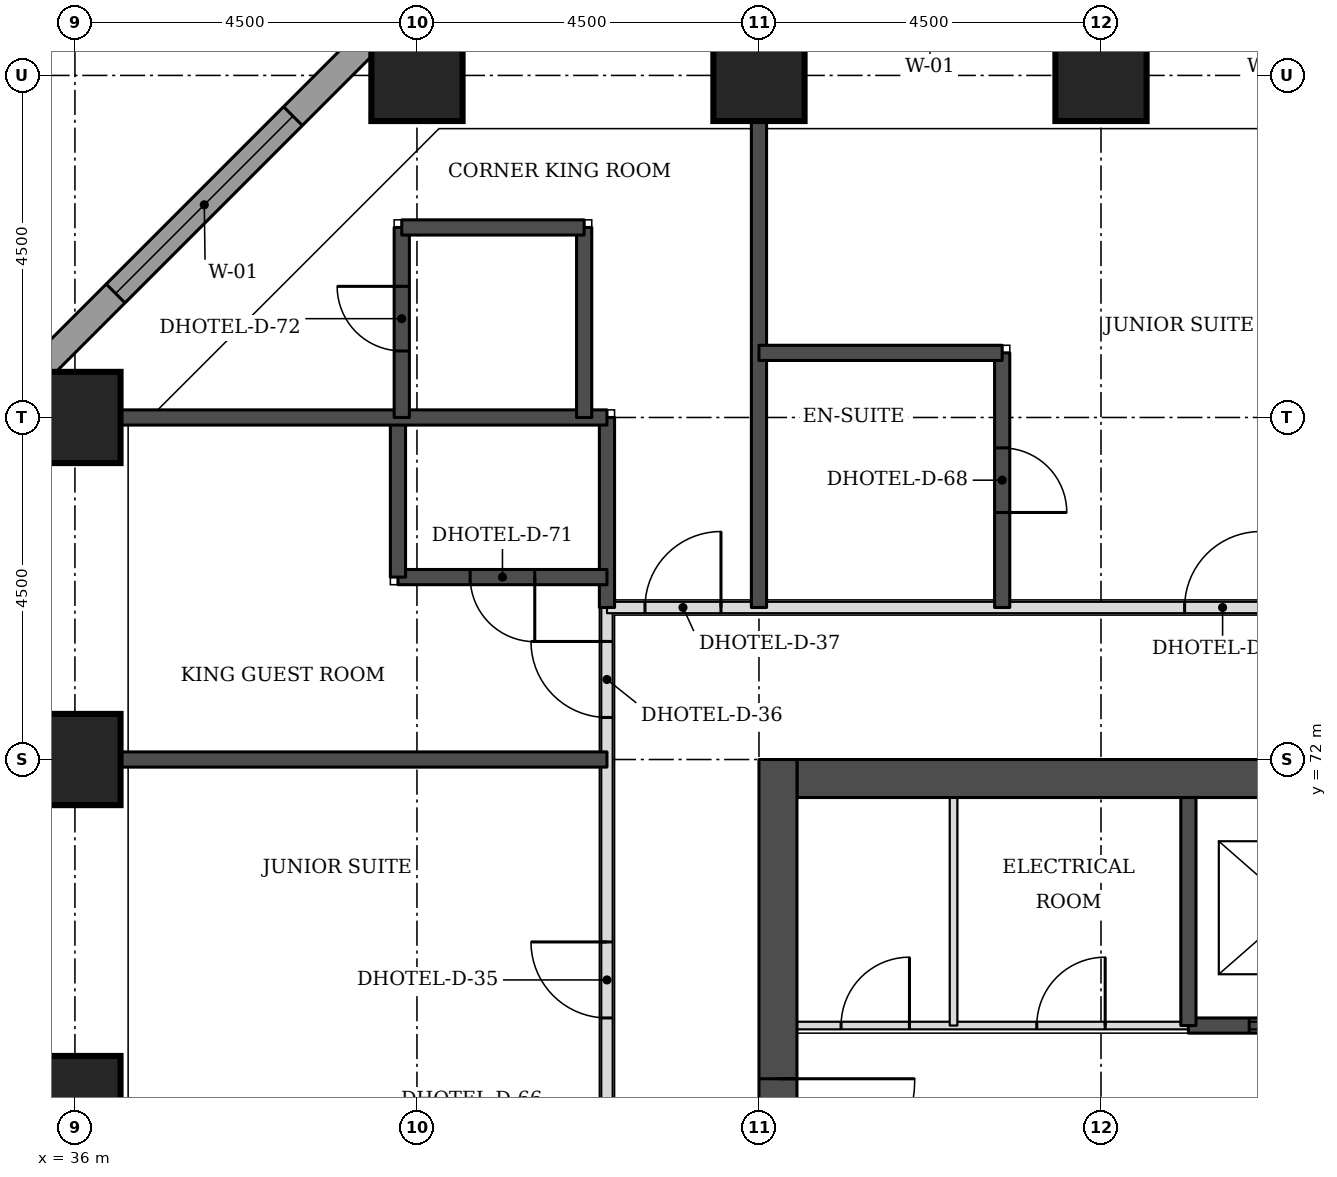
"""IFC4 building model, lengths in metres.
Left out: names, types, materials, properties, quantities, classifications, styles, units other than length and angle.
Written with IfcOpenShell. Run it as: python <this file> out.ifc"""

import sys

from ifc_helpers import new_model, si_unit, direction, frame, frame_2d, origin, origin_2d, place, context, subcontext, project, spatial, rectangle, extrude, element, fill, save


model = new_model("IFC4")
c1 = context("Model", 3, precision=1e-05, world=origin(), true_north=direction((0.0, 1.0)))
c2 = subcontext(c1, "Body", "Model", "MODEL_VIEW")
j1 = project(units=[si_unit("LENGTHUNIT", "METRE"), si_unit("PLANEANGLEUNIT", "RADIAN")], contexts=[c1])
p1 = place(None, origin())
s1 = spatial("IfcSite", under=j1, at=p1, CompositionType="ELEMENT")
p2 = place(p1, origin())
s2 = spatial("IfcBuilding", under=s1, at=p2, CompositionType="ELEMENT")
p3 = place(p2, frame((0.0, 0.0, 36.3)))
s3 = spatial("IfcBuildingStorey", under=s2, at=p3, CompositionType="ELEMENT", Elevation=36.3)
for number, where, z_axis, x_axis in (
    (1, (36.0, 67.5, 0.0), (0.0, 0.0, 1.0), (1.0, 0.0, 0.0)),
    (2, (36.0, 72.0, 0.0), (0.0, 0.0, 1.0), (1.0, 0.0, 0.0)),
    (3, (36.0, 76.5, 0.0), (0.0, 0.0, 1.0), (1.0, 0.0, 0.0)),
    (4, (40.5, 81.0, 0.0), (0.0, 0.0, 1.0), (1.0, 0.0, 0.0)),
    (5, (45.0, 81.0, 0.0), (0.0, 0.0, 1.0), (1.0, 0.0, 0.0)),
    (6, (49.5, 81.0, 0.0), (0.0, 0.0, 1.0), (1.0, 0.0, 0.0)),
):
    element("IfcColumn", number, at=place(p3, frame(where, z_axis=z_axis, x_axis=x_axis)), inside=s3, PredefinedType="COLUMN", context=c2, shape_type="SweptSolid", body=[
        extrude(rectangle(XDim=1.2, YDim=1.2, at=origin_2d()), origin(), (0.0, 0.0, 1.0), 3.3),
    ])
p4 = place(p3, frame((45.5, 71.75, 0.0), z_axis=(0.0, 0.0, 1.0), x_axis=(1.0, 0.0, 0.0)))
e7 = element("IfcWall", 7, at=p4, inside=s3, PredefinedType="SHEAR", context=c2, shape_type="SweptSolid", body=[
    extrude(rectangle(XDim=21.5, YDim=0.5, at=frame_2d((10.75, 0.0))), origin(), (0.0, 0.0, 1.0), 3.3),
])
p5 = place(p3, frame((45.25, 49.5, 0.0), z_axis=(0.0, 0.0, 1.0), x_axis=(0.0, 1.0, 0.0)))
e8 = element("IfcWall", 8, at=p5, inside=s3, PredefinedType="SHEAR", context=c2, shape_type="SweptSolid", body=[
    extrude(rectangle(XDim=22.5, YDim=0.5, at=frame_2d((11.25, 0.0))), origin(), (0.0, 0.0, 1.0), 3.3),
])
p6 = place(p5, frame((4.2, 0.0, 0.0)))
e9 = element("IfcOpeningElement", 9, at=p6, cuts=e8, PredefinedType="OPENING", context=c2, shape_type="SweptSolid", body=[
    extrude(rectangle(XDim=1.8, YDim=2.1, at=frame_2d((0.9, 1.05))), frame((0.0, 0.26, 0.0), z_axis=(0.0, -1.0, 0.0), x_axis=(1.0, 0.0, 0.0)), (0.0, 0.0, 1.0), 0.52),
])
p7 = place(p5, frame((6.9, 0.0, 0.0)))
e10 = element("IfcOpeningElement", 10, at=p7, cuts=e8, PredefinedType="OPENING", context=c2, shape_type="SweptSolid", body=[
    extrude(rectangle(XDim=1.1, YDim=2.1, at=frame_2d((0.55, 1.05))), frame((0.0, 0.26, 0.0), z_axis=(0.0, -1.0, 0.0), x_axis=(1.0, 0.0, 0.0)), (0.0, 0.0, 1.0), 0.52),
])
p8 = place(p5, frame((13.6, 0.0, 0.0)))
e11 = element("IfcOpeningElement", 11, at=p8, cuts=e8, PredefinedType="OPENING", context=c2, shape_type="SweptSolid", body=[
    extrude(rectangle(XDim=1.1, YDim=2.1, at=frame_2d((0.55, 1.05))), frame((0.0, 0.26, 0.0), z_axis=(0.0, -1.0, 0.0), x_axis=(1.0, 0.0, 0.0)), (0.0, 0.0, 1.0), 0.52),
])
p9 = place(p5, frame((16.5, 0.0, 0.0)))
e12 = element("IfcOpeningElement", 12, at=p9, cuts=e8, PredefinedType="OPENING", context=c2, shape_type="SweptSolid", body=[
    extrude(rectangle(XDim=1.8, YDim=2.1, at=frame_2d((0.9, 1.05))), frame((0.0, 0.26, 0.0), z_axis=(0.0, -1.0, 0.0), x_axis=(1.0, 0.0, 0.0)), (0.0, 0.0, 1.0), 0.52),
])
p10 = place(p3, frame((40.23, 81.826, 0.0), z_axis=(0.0, 0.0, 1.0), x_axis=(-0.707106781187, -0.707106781187, 0.0)))
e13 = element("IfcWall", 13, at=p10, inside=s3, PredefinedType="STANDARD", context=c2, shape_type="SweptSolid", body=[
    extrude(rectangle(XDim=7.151, YDim=0.35, at=frame_2d((3.576, 0.0))), origin(), (0.0, 0.0, 1.0), 3.055),
])
p11 = place(p10, frame((1.926, 0.0, 0.8)))
e14 = element("IfcOpeningElement", 14, at=p11, cuts=e13, PredefinedType="OPENING", context=c2, shape_type="SweptSolid", body=[
    extrude(rectangle(XDim=3.3, YDim=1.5, at=frame_2d((1.65, 0.75))), frame((0.0, 0.185, 0.0), z_axis=(0.0, -1.0, 0.0), x_axis=(1.0, 0.0, 0.0)), (0.0, 0.0, 1.0), 0.37),
])
p12 = place(p3, frame((43.0, 57.35, 0.0), z_axis=(0.0, 0.0, 1.0), x_axis=(0.0, 1.0, 0.0)))
e15 = element("IfcWall", 15, at=p12, inside=s3, PredefinedType="PARTITIONING", context=c2, shape_type="SweptSolid", body=[
    extrude(rectangle(XDim=16.65, YDim=0.15, at=frame_2d((8.325, 0.0))), origin(), (0.0, 0.0, 1.0), 3.08),
])
p13 = place(p12, frame((11.25, 0.0, 0.0)))
e16 = element("IfcOpeningElement", 16, at=p13, cuts=e15, PredefinedType="OPENING", context=c2, shape_type="SweptSolid", body=[
    extrude(rectangle(XDim=1.0, YDim=2.1, at=frame_2d((0.5, 1.05))), frame((0.0, 0.085, 0.0), z_axis=(0.0, -1.0, 0.0), x_axis=(1.0, 0.0, 0.0)), (0.0, 0.0, 1.0), 0.17),
])
p14 = place(p12, frame((15.203, 0.0, 0.0)))
e17 = element("IfcOpeningElement", 17, at=p14, cuts=e15, PredefinedType="OPENING", context=c2, shape_type="SweptSolid", body=[
    extrude(rectangle(XDim=1.0, YDim=2.1, at=frame_2d((0.5, 1.05))), frame((0.0, 0.085, 0.0), z_axis=(0.0, -1.0, 0.0), x_axis=(1.0, 0.0, 0.0)), (0.0, 0.0, 1.0), 0.17),
])
p15 = place(p3, frame((43.0, 74.0, 0.0), z_axis=(0.0, 0.0, 1.0), x_axis=(1.0, 0.0, 0.0)))
e18 = element("IfcWall", 18, at=p15, inside=s3, PredefinedType="PARTITIONING", context=c2, shape_type="SweptSolid", body=[
    extrude(rectangle(XDim=26.5, YDim=0.15, at=frame_2d((13.25, 0.0))), origin(), (0.0, 0.0, 1.0), 3.08),
])
p16 = place(p15, frame((7.6, 0.0, 0.0)))
e19 = element("IfcOpeningElement", 19, at=p16, cuts=e18, PredefinedType="OPENING", context=c2, shape_type="SweptSolid", body=[
    extrude(rectangle(XDim=1.0, YDim=2.1, at=frame_2d((0.5, 1.05))), frame((0.0, 0.085, 0.0), z_axis=(0.0, -1.0, 0.0), x_axis=(1.0, 0.0, 0.0)), (0.0, 0.0, 1.0), 0.17),
])
p17 = place(p15, frame((13.65, 0.0, 0.0)))
e20 = element("IfcOpeningElement", 20, at=p17, cuts=e18, PredefinedType="OPENING", context=c2, shape_type="SweptSolid", body=[
    extrude(rectangle(XDim=1.0, YDim=2.1, at=frame_2d((0.5, 1.05))), frame((0.0, 0.085, 0.0), z_axis=(0.0, -1.0, 0.0), x_axis=(1.0, 0.0, 0.0)), (0.0, 0.0, 1.0), 0.17),
])
p18 = place(p15, frame((23.05, 0.0, 0.0)))
e21 = element("IfcOpeningElement", 21, at=p18, cuts=e18, PredefinedType="OPENING", context=c2, shape_type="SweptSolid", body=[
    extrude(rectangle(XDim=1.0, YDim=2.1, at=frame_2d((0.5, 1.05))), frame((0.0, 0.085, 0.0), z_axis=(0.0, -1.0, 0.0), x_axis=(1.0, 0.0, 0.0)), (0.0, 0.0, 1.0), 0.17),
])
p19 = place(p15, frame((0.5, 0.0, 0.0)))
e22 = element("IfcOpeningElement", 22, at=p19, cuts=e18, PredefinedType="OPENING", context=c2, shape_type="SweptSolid", body=[
    extrude(rectangle(XDim=1.0, YDim=2.1, at=frame_2d((0.5, 1.05))), frame((0.0, 0.085, 0.0), z_axis=(0.0, -1.0, 0.0), x_axis=(1.0, 0.0, 0.0)), (0.0, 0.0, 1.0), 0.17),
])
p20 = place(p15, frame((25.0, 0.0, 0.0)))
e23 = element("IfcOpeningElement", 23, at=p20, cuts=e18, PredefinedType="OPENING", context=c2, shape_type="SweptSolid", body=[
    extrude(rectangle(XDim=1.0, YDim=2.1, at=frame_2d((0.5, 1.05))), frame((0.0, 0.085, 0.0), z_axis=(0.0, -1.0, 0.0), x_axis=(1.0, 0.0, 0.0)), (0.0, 0.0, 1.0), 0.17),
])
p21 = place(p3, frame((36.6, 72.0, 0.0), z_axis=(0.0, 0.0, 1.0), x_axis=(1.0, 0.0, 0.0)))
e24 = element("IfcWall", 24, at=p21, inside=s3, PredefinedType="SOLIDWALL", context=c2, shape_type="SweptSolid", body=[
    extrude(rectangle(XDim=6.4, YDim=0.2, at=frame_2d((3.2, 0.0))), origin(), (0.0, 0.0, 1.0), 3.08),
])
p22 = place(p3, frame((43.0, 74.0, 0.0), z_axis=(0.0, 0.0, 1.0), x_axis=(0.0, 1.0, 0.0)))
e25 = element("IfcWall", 25, at=p22, inside=s3, PredefinedType="SOLIDWALL", context=c2, shape_type="SweptSolid", body=[
    extrude(rectangle(XDim=2.5, YDim=0.2, at=frame_2d((1.25, 0.0))), origin(), (0.0, 0.0, 1.0), 3.08),
])
p23 = place(p3, frame((45.0, 74.0, 0.0), z_axis=(0.0, 0.0, 1.0), x_axis=(0.0, 1.0, 0.0)))
e26 = element("IfcWall", 26, at=p23, inside=s3, PredefinedType="SOLIDWALL", context=c2, shape_type="SweptSolid", body=[
    extrude(rectangle(XDim=6.4, YDim=0.2, at=frame_2d((3.2, 0.0))), origin(), (0.0, 0.0, 1.0), 3.08),
])
p24 = place(p3, frame((48.2, 74.0, 0.0), z_axis=(0.0, 0.0, 1.0), x_axis=(0.0, 1.0, 0.0)))
e27 = element("IfcWall", 27, at=p24, inside=s3, PredefinedType="SOLIDWALL", context=c2, shape_type="SweptSolid", body=[
    extrude(rectangle(XDim=3.35, YDim=0.2, at=frame_2d((1.675, 0.0))), origin(), (0.0, 0.0, 1.0), 3.08),
])
p25 = place(p24, frame((1.25, 0.0, 0.0)))
e28 = element("IfcOpeningElement", 28, at=p25, cuts=e27, PredefinedType="OPENING", context=c2, shape_type="SweptSolid", body=[
    extrude(rectangle(XDim=0.85, YDim=2.1, at=frame_2d((0.425, 1.05))), frame((0.0, 0.11, 0.0), z_axis=(0.0, -1.0, 0.0), x_axis=(1.0, 0.0, 0.0)), (0.0, 0.0, 1.0), 0.22),
])
p26 = place(p3, frame((40.25, 74.4, 0.0), z_axis=(0.0, 0.0, 1.0), x_axis=(1.0, 0.0, 0.0)))
e29 = element("IfcWall", 29, at=p26, inside=s3, PredefinedType="SOLIDWALL", context=c2, shape_type="SweptSolid", body=[
    extrude(rectangle(XDim=2.75, YDim=0.2, at=frame_2d((1.375, 0.0))), origin(), (0.0, 0.0, 1.0), 3.08),
])
p27 = place(p26, frame((0.95, 0.0, 0.0)))
e30 = element("IfcOpeningElement", 30, at=p27, cuts=e29, PredefinedType="OPENING", context=c2, shape_type="SweptSolid", body=[
    extrude(rectangle(XDim=0.85, YDim=2.1, at=frame_2d((0.425, 1.05))), frame((0.0, 0.11, 0.0), z_axis=(0.0, -1.0, 0.0), x_axis=(1.0, 0.0, 0.0)), (0.0, 0.0, 1.0), 0.22),
])
p28 = place(p3, frame((40.25, 74.4, 0.0), z_axis=(0.0, 0.0, 1.0), x_axis=(0.0, 1.0, 0.0)))
e31 = element("IfcWall", 31, at=p28, inside=s3, PredefinedType="SOLIDWALL", context=c2, shape_type="SweptSolid", body=[
    extrude(rectangle(XDim=2.1, YDim=0.2, at=frame_2d((1.05, 0.0))), origin(), (0.0, 0.0, 1.0), 3.08),
])
p29 = place(p3, frame((36.6, 76.5, 0.0), z_axis=(0.0, 0.0, 1.0), x_axis=(1.0, 0.0, 0.0)))
e32 = element("IfcWall", 32, at=p29, inside=s3, PredefinedType="SOLIDWALL", context=c2, shape_type="SweptSolid", body=[
    extrude(rectangle(XDim=6.4, YDim=0.2, at=frame_2d((3.2, 0.0))), origin(), (0.0, 0.0, 1.0), 3.08),
])
p30 = place(p3, frame((40.3, 76.5, 0.0), z_axis=(0.0, 0.0, 1.0), x_axis=(0.0, 1.0, 0.0)))
e33 = element("IfcWall", 33, at=p30, inside=s3, PredefinedType="SOLIDWALL", context=c2, shape_type="SweptSolid", body=[
    extrude(rectangle(XDim=2.5, YDim=0.2, at=frame_2d((1.25, 0.0))), origin(), (0.0, 0.0, 1.0), 3.08),
])
p31 = place(p30, frame((0.875, 0.0, 0.0)))
e34 = element("IfcOpeningElement", 34, at=p31, cuts=e33, PredefinedType="OPENING", context=c2, shape_type="SweptSolid", body=[
    extrude(rectangle(XDim=0.85, YDim=2.1, at=frame_2d((0.425, 1.05))), frame((0.0, 0.11, 0.0), z_axis=(0.0, -1.0, 0.0), x_axis=(1.0, 0.0, 0.0)), (0.0, 0.0, 1.0), 0.22),
])
p32 = place(p3, frame((42.7, 76.5, 0.0), z_axis=(0.0, 0.0, 1.0), x_axis=(0.0, 1.0, 0.0)))
e35 = element("IfcWall", 35, at=p32, inside=s3, PredefinedType="SOLIDWALL", context=c2, shape_type="SweptSolid", body=[
    extrude(rectangle(XDim=2.5, YDim=0.2, at=frame_2d((1.25, 0.0))), origin(), (0.0, 0.0, 1.0), 3.08),
])
p33 = place(p3, frame((45.0, 77.35, 0.0), z_axis=(0.0, 0.0, 1.0), x_axis=(1.0, 0.0, 0.0)))
e36 = element("IfcWall", 36, at=p33, inside=s3, PredefinedType="SOLIDWALL", context=c2, shape_type="SweptSolid", body=[
    extrude(rectangle(XDim=3.2, YDim=0.2, at=frame_2d((1.6, 0.0))), origin(), (0.0, 0.0, 1.0), 3.08),
])
p34 = place(p3, frame((40.3, 79.0, 0.0), z_axis=(0.0, 0.0, 1.0), x_axis=(1.0, 0.0, 0.0)))
e37 = element("IfcWall", 37, at=p34, inside=s3, PredefinedType="SOLIDWALL", context=c2, shape_type="SweptSolid", body=[
    extrude(rectangle(XDim=2.4, YDim=0.2, at=frame_2d((1.2, 0.0))), origin(), (0.0, 0.0, 1.0), 3.08),
])
p35 = place(p3, frame((45.5, 68.5, 0.0), z_axis=(0.0, 0.0, 1.0), x_axis=(1.0, 0.0, 0.0)))
e38 = element("IfcWall", 38, at=p35, inside=s3, PredefinedType="PARTITIONING", context=c2, shape_type="SweptSolid", body=[
    extrude(rectangle(XDim=5.15, YDim=0.1, at=frame_2d((2.575, 0.0))), origin(), (0.0, 0.0, 1.0), 3.08),
])
p36 = place(p35, frame((0.58, 0.0, 0.0)))
e39 = element("IfcOpeningElement", 39, at=p36, cuts=e38, PredefinedType="OPENING", context=c2, shape_type="SweptSolid", body=[
    extrude(rectangle(XDim=0.9, YDim=2.1, at=frame_2d((0.45, 1.05))), frame((0.0, 0.06, 0.0), z_axis=(0.0, -1.0, 0.0), x_axis=(1.0, 0.0, 0.0)), (0.0, 0.0, 1.0), 0.12),
])
p37 = place(p35, frame((3.155, 0.0, 0.0)))
e40 = element("IfcOpeningElement", 40, at=p37, cuts=e38, PredefinedType="OPENING", context=c2, shape_type="SweptSolid", body=[
    extrude(rectangle(XDim=0.9, YDim=2.1, at=frame_2d((0.45, 1.05))), frame((0.0, 0.06, 0.0), z_axis=(0.0, -1.0, 0.0), x_axis=(1.0, 0.0, 0.0)), (0.0, 0.0, 1.0), 0.12),
])
p38 = place(p3, frame((50.65, 68.5, 0.0), z_axis=(0.0, 0.0, 1.0), x_axis=(1.0, 0.0, 0.0)))
e41 = element("IfcWall", 41, at=p38, inside=s3, PredefinedType="SOLIDWALL", context=c2, shape_type="SweptSolid", body=[
    extrude(rectangle(XDim=11.2, YDim=0.2, at=frame_2d((5.6, 0.0))), origin(), (0.0, 0.0, 1.0), 3.08),
])
p39 = place(p38, frame((0.8, 0.0, 0.0)))
e42 = element("IfcOpeningElement", 42, at=p39, cuts=e41, PredefinedType="OPENING", context=c2, shape_type="SweptSolid", body=[
    extrude(rectangle(XDim=1.2, YDim=2.1, at=frame_2d((0.6, 1.05))), frame((0.0, 0.11, 0.0), z_axis=(0.0, -1.0, 0.0), x_axis=(1.0, 0.0, 0.0)), (0.0, 0.0, 1.0), 0.22),
])
p40 = place(p38, frame((3.6, 0.0, 0.0)))
e43 = element("IfcOpeningElement", 43, at=p40, cuts=e41, PredefinedType="OPENING", context=c2, shape_type="SweptSolid", body=[
    extrude(rectangle(XDim=1.2, YDim=2.1, at=frame_2d((0.6, 1.05))), frame((0.0, 0.11, 0.0), z_axis=(0.0, -1.0, 0.0), x_axis=(1.0, 0.0, 0.0)), (0.0, 0.0, 1.0), 0.22),
])
p41 = place(p38, frame((6.4, 0.0, 0.0)))
e44 = element("IfcOpeningElement", 44, at=p41, cuts=e41, PredefinedType="OPENING", context=c2, shape_type="SweptSolid", body=[
    extrude(rectangle(XDim=1.2, YDim=2.1, at=frame_2d((0.6, 1.05))), frame((0.0, 0.11, 0.0), z_axis=(0.0, -1.0, 0.0), x_axis=(1.0, 0.0, 0.0)), (0.0, 0.0, 1.0), 0.22),
])
p42 = place(p38, frame((9.2, 0.0, 0.0)))
e45 = element("IfcOpeningElement", 45, at=p42, cuts=e41, PredefinedType="OPENING", context=c2, shape_type="SweptSolid", body=[
    extrude(rectangle(XDim=1.2, YDim=2.1, at=frame_2d((0.6, 1.05))), frame((0.0, 0.11, 0.0), z_axis=(0.0, -1.0, 0.0), x_axis=(1.0, 0.0, 0.0)), (0.0, 0.0, 1.0), 0.22),
])
p43 = place(p3, frame((47.56, 68.5, 0.0), z_axis=(0.0, 0.0, 1.0), x_axis=(0.0, 1.0, 0.0)))
e46 = element("IfcWall", 46, at=p43, inside=s3, PredefinedType="PARTITIONING", context=c2, shape_type="SweptSolid", body=[
    extrude(rectangle(XDim=3.0, YDim=0.1, at=frame_2d((1.5, 0.0))), origin(), (0.0, 0.0, 1.0), 3.08),
])
p44 = place(p3, frame((50.65, 68.5, 0.0), z_axis=(0.0, 0.0, 1.0), x_axis=(0.0, 1.0, 0.0)))
e47 = element("IfcWall", 47, at=p44, inside=s3, PredefinedType="SOLIDWALL", context=c2, shape_type="SweptSolid", body=[
    extrude(rectangle(XDim=3.0, YDim=0.2, at=frame_2d((1.5, 0.0))), origin(), (0.0, 0.0, 1.0), 3.08),
])
p45 = place(p11, origin())
e48 = element("IfcWindow", 48, at=p45, inside=s3, PartitioningType="SINGLE_PANEL", PredefinedType="WINDOW", context=c2, shape_type="SweptSolid", body=[
    extrude(rectangle(XDim=3.3, YDim=1.5, at=frame_2d((1.65, 0.75))), frame((0.0, 0.085, 0.0), z_axis=(0.0, -1.0, 0.0), x_axis=(1.0, 0.0, 0.0)), (0.0, 0.0, 1.0), 0.06),
])
fill(e14, e48)
p46 = place(p13, origin())
e49 = element("IfcDoor", 49, at=p46, inside=s3, OperationType="SINGLE_SWING_RIGHT", PredefinedType="DOOR", context=c2, shape_type="SweptSolid", body=[
    extrude(rectangle(XDim=1.0, YDim=2.1, at=frame_2d((0.5, 1.05))), frame((0.0, 0.025, 0.0), z_axis=(0.0, -1.0, 0.0), x_axis=(1.0, 0.0, 0.0)), (0.0, 0.0, 1.0), 0.05),
])
fill(e16, e49)
p47 = place(p14, origin())
e50 = element("IfcDoor", 50, at=p47, inside=s3, OperationType="SINGLE_SWING_RIGHT", PredefinedType="DOOR", context=c2, shape_type="SweptSolid", body=[
    extrude(rectangle(XDim=1.0, YDim=2.1, at=frame_2d((0.5, 1.05))), frame((0.0, 0.025, 0.0), z_axis=(0.0, -1.0, 0.0), x_axis=(1.0, 0.0, 0.0)), (0.0, 0.0, 1.0), 0.05),
])
fill(e17, e50)
p48 = place(p27, frame((0.85, 0.0, 0.0), z_axis=(0.0, 0.0, 1.0), x_axis=(-1.0, 0.0, 0.0)))
e51 = element("IfcDoor", 51, at=p48, inside=s3, OperationType="SINGLE_SWING_LEFT", PredefinedType="DOOR", context=c2, shape_type="SweptSolid", body=[
    extrude(rectangle(XDim=0.85, YDim=2.1, at=frame_2d((0.425, 1.05))), frame((0.0, 0.025, 0.0), z_axis=(0.0, -1.0, 0.0), x_axis=(1.0, 0.0, 0.0)), (0.0, 0.0, 1.0), 0.05),
])
fill(e30, e51)
p49 = place(p16, origin())
e52 = element("IfcDoor", 52, at=p49, inside=s3, OperationType="SINGLE_SWING_RIGHT", PredefinedType="DOOR", context=c2, shape_type="SweptSolid", body=[
    extrude(rectangle(XDim=1.0, YDim=2.1, at=frame_2d((0.5, 1.05))), frame((0.0, 0.025, 0.0), z_axis=(0.0, -1.0, 0.0), x_axis=(1.0, 0.0, 0.0)), (0.0, 0.0, 1.0), 0.05),
])
fill(e19, e52)
p50 = place(p25, frame((0.85, 0.0, 0.0), z_axis=(0.0, 0.0, 1.0), x_axis=(-1.0, 0.0, 0.0)))
e53 = element("IfcDoor", 53, at=p50, inside=s3, OperationType="SINGLE_SWING_RIGHT", PredefinedType="DOOR", context=c2, shape_type="SweptSolid", body=[
    extrude(rectangle(XDim=0.85, YDim=2.1, at=frame_2d((0.425, 1.05))), frame((0.0, 0.025, 0.0), z_axis=(0.0, -1.0, 0.0), x_axis=(1.0, 0.0, 0.0)), (0.0, 0.0, 1.0), 0.05),
])
fill(e28, e53)
p51 = place(p19, origin())
e54 = element("IfcDoor", 54, at=p51, inside=s3, OperationType="SINGLE_SWING_RIGHT", PredefinedType="DOOR", context=c2, shape_type="SweptSolid", body=[
    extrude(rectangle(XDim=1.0, YDim=2.1, at=frame_2d((0.5, 1.05))), frame((0.0, 0.025, 0.0), z_axis=(0.0, -1.0, 0.0), x_axis=(1.0, 0.0, 0.0)), (0.0, 0.0, 1.0), 0.05),
])
fill(e22, e54)
p52 = place(p31, origin())
e55 = element("IfcDoor", 55, at=p52, inside=s3, OperationType="SINGLE_SWING_RIGHT", PredefinedType="DOOR", context=c2, shape_type="SweptSolid", body=[
    extrude(rectangle(XDim=0.85, YDim=2.1, at=frame_2d((0.425, 1.05))), frame((0.0, 0.025, 0.0), z_axis=(0.0, -1.0, 0.0), x_axis=(1.0, 0.0, 0.0)), (0.0, 0.0, 1.0), 0.05),
])
fill(e34, e55)
p53 = place(p39, origin())
e56 = element("IfcDoor", 56, at=p53, inside=s3, OperationType="DOUBLE_DOOR_SLIDING", PredefinedType="DOOR", context=c2, shape_type="SweptSolid", body=[
    extrude(rectangle(XDim=1.2, YDim=2.1, at=frame_2d((0.6, 1.05))), frame((0.0, 0.025, 0.0), z_axis=(0.0, -1.0, 0.0), x_axis=(1.0, 0.0, 0.0)), (0.0, 0.0, 1.0), 0.05),
])
fill(e42, e56)
p54 = place(p9, frame((1.8, 0.0, 0.0), z_axis=(0.0, 0.0, 1.0), x_axis=(-1.0, 0.0, 0.0)))
e57 = element("IfcDoor", 57, at=p54, inside=s3, OperationType="SINGLE_SWING_LEFT", PredefinedType="DOOR", context=c2, shape_type="SweptSolid", body=[
    extrude(rectangle(XDim=1.8, YDim=2.1, at=frame_2d((0.9, 1.05))), frame((0.0, 0.025, 0.0), z_axis=(0.0, -1.0, 0.0), x_axis=(1.0, 0.0, 0.0)), (0.0, 0.0, 1.0), 0.05),
])
fill(e12, e57)
p55 = place(p36, origin())
e58 = element("IfcDoor", 58, at=p55, inside=s3, OperationType="SINGLE_SWING_RIGHT", PredefinedType="DOOR", context=c2, shape_type="SweptSolid", body=[
    extrude(rectangle(XDim=0.9, YDim=2.1, at=frame_2d((0.45, 1.05))), frame((0.0, 0.025, 0.0), z_axis=(0.0, -1.0, 0.0), x_axis=(1.0, 0.0, 0.0)), (0.0, 0.0, 1.0), 0.05),
])
fill(e39, e58)
p56 = place(p37, origin())
e59 = element("IfcDoor", 59, at=p56, inside=s3, OperationType="SINGLE_SWING_RIGHT", PredefinedType="DOOR", context=c2, shape_type="SweptSolid", body=[
    extrude(rectangle(XDim=0.9, YDim=2.1, at=frame_2d((0.45, 1.05))), frame((0.0, 0.025, 0.0), z_axis=(0.0, -1.0, 0.0), x_axis=(1.0, 0.0, 0.0)), (0.0, 0.0, 1.0), 0.05),
])
fill(e40, e59)
save(model, sys.argv[1])
